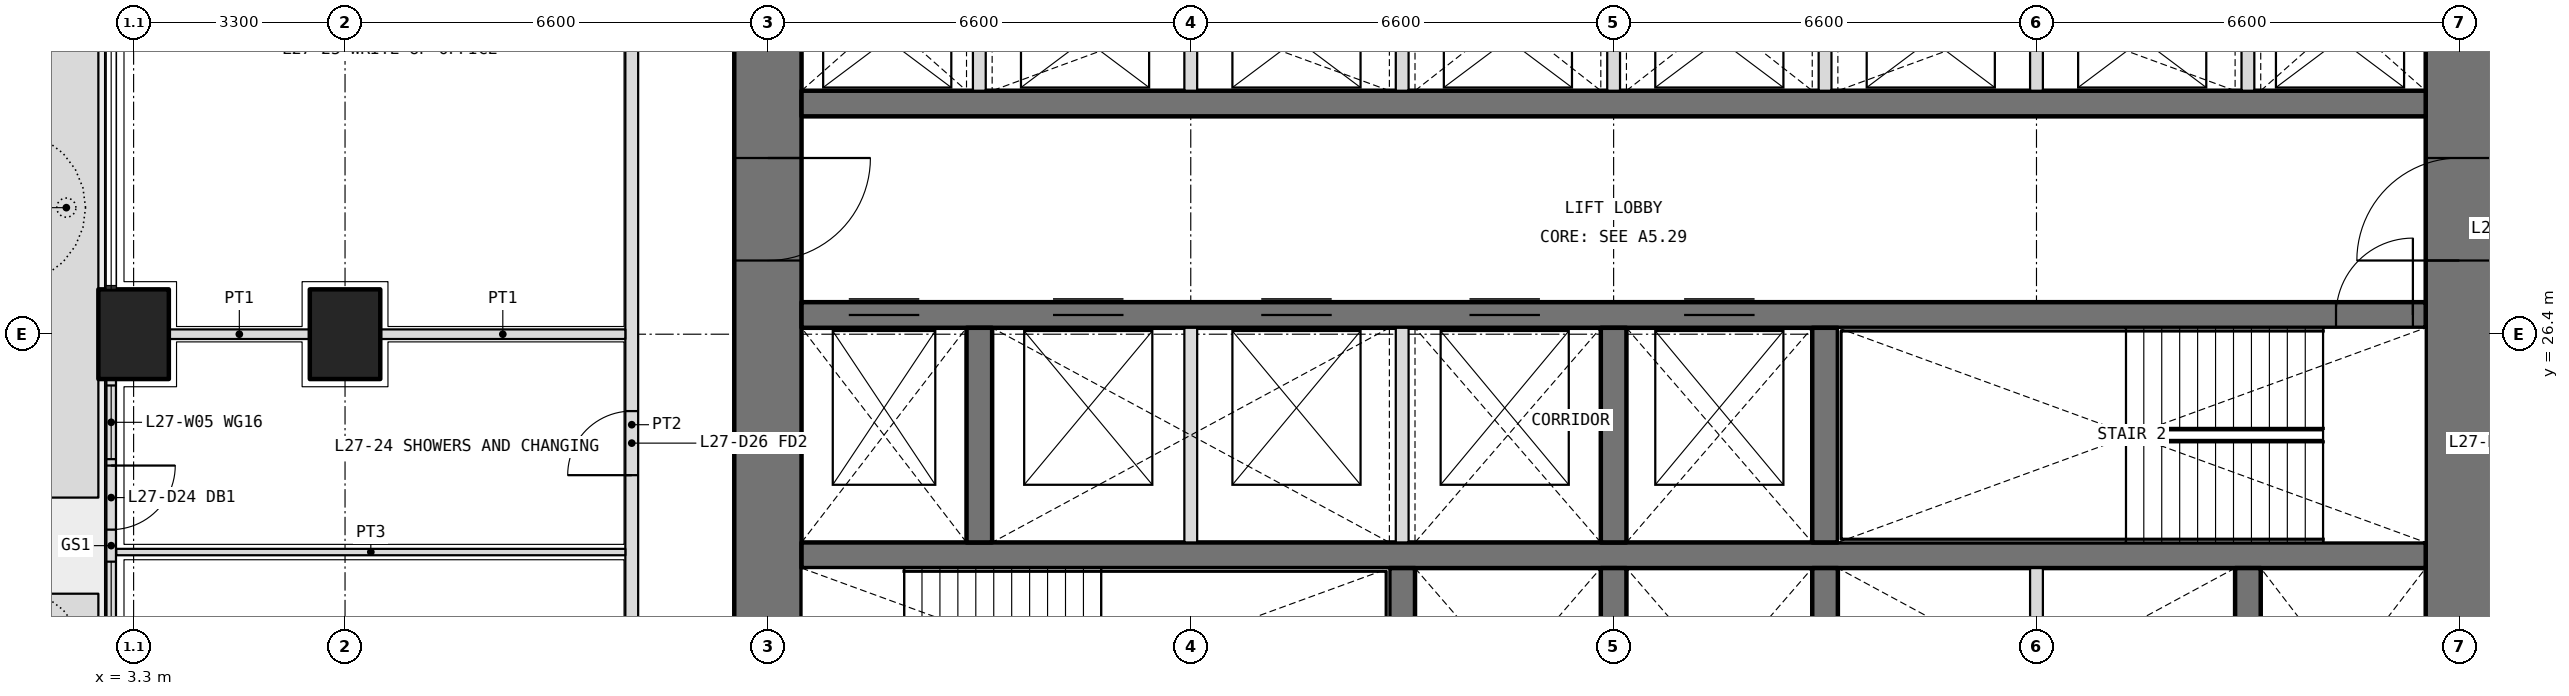
"""IFC4 building model, lengths in metres.
Left out: names, types, materials, properties, quantities, classifications, styles, units other than length and angle.
Written with IfcOpenShell. Run it as: python <this file> out.ifc"""

import sys

from ifc_helpers import new_model, si_unit, direction, frame, frame_2d, origin, origin_2d, place, context, subcontext, project, spatial, polyline, rectangle, outline, extrude, element, fill, save


model = new_model("IFC4")
c1 = context("Model", 3, precision=1e-05, world=origin(), true_north=direction((0.0, 1.0)))
c2 = subcontext(c1, "Body", "Model", "MODEL_VIEW")
j1 = project(units=[si_unit("LENGTHUNIT", "METRE"), si_unit("PLANEANGLEUNIT", "RADIAN")], contexts=[c1])
p1 = place(None, origin())
s1 = spatial("IfcSite", under=j1, at=p1, CompositionType="ELEMENT")
p2 = place(p1, origin())
s2 = spatial("IfcBuilding", under=s1, at=p2, CompositionType="ELEMENT")
p3 = place(p2, frame((0.0, 0.0, 120.0)))
s3 = spatial("IfcBuildingStorey", under=s2, at=p3, CompositionType="ELEMENT", Elevation=120.0)
for number, where, z_axis, x_axis in (
    (1, (3.3, 26.4, 0.0), (0.0, 0.0, 1.0), (0.0, 1.0, 0.0)),
    (2, (6.6, 26.4, 0.0), (0.0, 0.0, 1.0), (0.0, 1.0, 0.0)),
):
    element("IfcColumn", number, at=place(p3, frame(where, z_axis=z_axis, x_axis=x_axis)), inside=s3, PredefinedType="COLUMN", context=c2, shape_type="SweptSolid", body=[
        extrude(rectangle(XDim=1.4, YDim=1.1, at=origin_2d()), origin(), (0.0, 0.0, 1.0), 4.2),
    ])
p4 = place(p3, origin())
e3 = element("IfcWall", 3, at=p4, inside=s3, PredefinedType="USERDEFINED", context=c2, shape_type="SweptSolid", body=[
    extrude(outline(polyline([(1.75, 19.9), (2.75, 19.9), (2.75, 22.35), (1.75, 22.35), (1.75, 19.9)]), holes=[polyline([(1.9, 20.05), (2.6, 20.05), (2.6, 22.2), (1.9, 22.2), (1.9, 20.05)])]), origin(), (0.0, 0.0, 1.0), 1.05),
])
p5 = place(p3, origin())
e4 = element("IfcWall", 4, at=p5, inside=s3, PredefinedType="USERDEFINED", context=c2, shape_type="SweptSolid", body=[
    extrude(outline(polyline([(1.75, 23.85), (2.75, 23.85), (2.75, 32.9), (1.75, 32.9), (1.75, 23.85)]), holes=[polyline([(1.9, 24.0), (2.6, 24.0), (2.6, 32.75), (1.9, 32.75), (1.9, 24.0)])]), origin(), (0.0, 0.0, 1.0), 1.05),
])
p6 = place(p3, frame((2.95, 25.7, 0.0), z_axis=(0.0, 0.0, 1.0), x_axis=(0.0, -1.0, 0.0)))
e5 = element("IfcWall", 5, at=p6, inside=s3, PredefinedType="SOLIDWALL", context=c2, shape_type="SweptSolid", body=[
    extrude(rectangle(XDim=5.2, YDim=0.15, at=frame_2d((2.6, 0.0))), origin(), (0.0, 0.0, 1.0), 2.7),
])
p7 = place(p6, frame((1.35, 0.0, 0.0)))
e6 = element("IfcOpeningElement", 6, at=p7, cuts=e5, PredefinedType="OPENING", context=c2, shape_type="SweptSolid", body=[
    extrude(rectangle(XDim=1.0, YDim=2.4, at=frame_2d((0.5, 1.2))), frame((0.0, 0.085, 0.0), z_axis=(0.0, -1.0, 0.0), x_axis=(1.0, 0.0, 0.0)), (0.0, 0.0, 1.0), 0.17),
])
p8 = place(p6, frame((0.1, 0.0, 0.1)))
e7 = element("IfcOpeningElement", 7, at=p8, cuts=e5, PredefinedType="OPENING", context=c2, shape_type="SweptSolid", body=[
    extrude(rectangle(XDim=1.15, YDim=2.3, at=frame_2d((0.575, 1.15))), frame((0.0, 0.085, 0.0), z_axis=(0.0, -1.0, 0.0), x_axis=(1.0, 0.0, 0.0)), (0.0, 0.0, 1.0), 0.17),
])
p9 = place(p6, frame((2.85, 0.0, 0.1)))
e8 = element("IfcOpeningElement", 8, at=p9, cuts=e5, PredefinedType="OPENING", context=c2, shape_type="SweptSolid", body=[
    extrude(rectangle(XDim=2.25, YDim=2.3, at=frame_2d((1.125, 1.15))), frame((0.0, 0.085, 0.0), z_axis=(0.0, -1.0, 0.0), x_axis=(1.0, 0.0, 0.0)), (0.0, 0.0, 1.0), 0.17),
])
p10 = place(p3, frame((39.6, 13.725, 0.0), z_axis=(0.0, 0.0, 1.0), x_axis=(0.0, 1.0, 0.0)))
e9 = element("IfcWall", 9, at=p10, inside=s3, PredefinedType="SHEAR", context=c2, shape_type="SweptSolid", body=[
    extrude(rectangle(XDim=18.75, YDim=1.05, at=frame_2d((9.375, 0.0))), origin(), (0.0, 0.0, 1.0), 4.2),
])
p11 = place(p10, frame((3.025, 0.0, 0.0)))
e10 = element("IfcOpeningElement", 10, at=p11, cuts=e9, PredefinedType="OPENING", context=c2, shape_type="SweptSolid", body=[
    extrude(rectangle(XDim=1.6, YDim=2.1, at=frame_2d((0.8, 1.05))), frame((0.0, 0.535, 0.0), z_axis=(0.0, -1.0, 0.0), x_axis=(1.0, 0.0, 0.0)), (0.0, 0.0, 1.0), 1.07),
])
p12 = place(p10, frame((13.825, 0.0, 0.0)))
e11 = element("IfcOpeningElement", 11, at=p12, cuts=e9, PredefinedType="OPENING", context=c2, shape_type="SweptSolid", body=[
    extrude(rectangle(XDim=1.6, YDim=2.1, at=frame_2d((0.8, 1.05))), frame((0.0, 0.535, 0.0), z_axis=(0.0, -1.0, 0.0), x_axis=(1.0, 0.0, 0.0)), (0.0, 0.0, 1.0), 1.07),
])
p13 = place(p3, frame((13.2, 32.475, 0.0), z_axis=(0.0, 0.0, 1.0), x_axis=(0.0, -1.0, 0.0)))
e12 = element("IfcWall", 12, at=p13, inside=s3, PredefinedType="SHEAR", context=c2, shape_type="SweptSolid", body=[
    extrude(rectangle(XDim=18.75, YDim=1.05, at=frame_2d((9.375, 0.0))), origin(), (0.0, 0.0, 1.0), 4.2),
])
p14 = place(p13, frame((14.125, 0.0, 0.0)))
e13 = element("IfcOpeningElement", 13, at=p14, cuts=e12, PredefinedType="OPENING", context=c2, shape_type="SweptSolid", body=[
    extrude(rectangle(XDim=1.6, YDim=2.1, at=frame_2d((0.8, 1.05))), frame((0.0, 0.535, 0.0), z_axis=(0.0, -1.0, 0.0), x_axis=(1.0, 0.0, 0.0)), (0.0, 0.0, 1.0), 1.07),
])
p15 = place(p13, frame((3.325, 0.0, 0.0)))
e14 = element("IfcOpeningElement", 14, at=p15, cuts=e12, PredefinedType="OPENING", context=c2, shape_type="SweptSolid", body=[
    extrude(rectangle(XDim=1.6, YDim=2.1, at=frame_2d((0.8, 1.05))), frame((0.0, 0.535, 0.0), z_axis=(0.0, -1.0, 0.0), x_axis=(1.0, 0.0, 0.0)), (0.0, 0.0, 1.0), 1.07),
])
p16 = place(p3, frame((13.725, 22.95, 0.0), z_axis=(0.0, 0.0, 1.0), x_axis=(1.0, 0.0, 0.0)))
e15 = element("IfcWall", 15, at=p16, inside=s3, PredefinedType="SHEAR", context=c2, shape_type="SweptSolid", body=[
    extrude(rectangle(XDim=25.35, YDim=0.4, at=frame_2d((12.675, 0.0))), origin(), (0.0, 0.0, 1.0), 4.2),
])
p17 = place(p3, frame((13.725, 26.7, 0.0), z_axis=(0.0, 0.0, 1.0), x_axis=(1.0, 0.0, 0.0)))
e16 = element("IfcWall", 16, at=p17, inside=s3, PredefinedType="SHEAR", context=c2, shape_type="SweptSolid", body=[
    extrude(rectangle(XDim=25.35, YDim=0.4, at=frame_2d((12.675, 0.0))), origin(), (0.0, 0.0, 1.0), 4.2),
])
p18 = place(p17, frame((23.95, 0.0, 0.0)))
e17 = element("IfcOpeningElement", 17, at=p18, cuts=e16, PredefinedType="OPENING", context=c2, shape_type="SweptSolid", body=[
    extrude(rectangle(XDim=1.2, YDim=2.1, at=frame_2d((0.6, 1.05))), frame((0.0, 0.21, 0.0), z_axis=(0.0, -1.0, 0.0), x_axis=(1.0, 0.0, 0.0)), (0.0, 0.0, 1.0), 0.42),
])
p19 = place(p17, frame((0.738, 0.0, 0.0)))
e18 = element("IfcOpeningElement", 18, at=p19, cuts=e16, PredefinedType="OPENING", context=c2, shape_type="SweptSolid", body=[
    extrude(rectangle(XDim=1.1, YDim=2.1, at=frame_2d((0.55, 1.05))), frame((0.0, 0.21, 0.0), z_axis=(0.0, -1.0, 0.0), x_axis=(1.0, 0.0, 0.0)), (0.0, 0.0, 1.0), 0.42),
])
p20 = place(p17, frame((3.925, 0.0, 0.0)))
e19 = element("IfcOpeningElement", 19, at=p20, cuts=e16, PredefinedType="OPENING", context=c2, shape_type="SweptSolid", body=[
    extrude(rectangle(XDim=1.1, YDim=2.1, at=frame_2d((0.55, 1.05))), frame((0.0, 0.21, 0.0), z_axis=(0.0, -1.0, 0.0), x_axis=(1.0, 0.0, 0.0)), (0.0, 0.0, 1.0), 0.42),
])
p21 = place(p17, frame((7.175, 0.0, 0.0)))
e20 = element("IfcOpeningElement", 20, at=p21, cuts=e16, PredefinedType="OPENING", context=c2, shape_type="SweptSolid", body=[
    extrude(rectangle(XDim=1.1, YDim=2.1, at=frame_2d((0.55, 1.05))), frame((0.0, 0.21, 0.0), z_axis=(0.0, -1.0, 0.0), x_axis=(1.0, 0.0, 0.0)), (0.0, 0.0, 1.0), 0.42),
])
p22 = place(p17, frame((10.425, 0.0, 0.0)))
e21 = element("IfcOpeningElement", 21, at=p22, cuts=e16, PredefinedType="OPENING", context=c2, shape_type="SweptSolid", body=[
    extrude(rectangle(XDim=1.1, YDim=2.1, at=frame_2d((0.55, 1.05))), frame((0.0, 0.21, 0.0), z_axis=(0.0, -1.0, 0.0), x_axis=(1.0, 0.0, 0.0)), (0.0, 0.0, 1.0), 0.42),
])
p23 = place(p17, frame((13.775, 0.0, 0.0)))
e22 = element("IfcOpeningElement", 22, at=p23, cuts=e16, PredefinedType="OPENING", context=c2, shape_type="SweptSolid", body=[
    extrude(rectangle(XDim=1.1, YDim=2.1, at=frame_2d((0.55, 1.05))), frame((0.0, 0.21, 0.0), z_axis=(0.0, -1.0, 0.0), x_axis=(1.0, 0.0, 0.0)), (0.0, 0.0, 1.0), 0.42),
])
p24 = place(p3, frame((13.725, 30.0, 0.0), z_axis=(0.0, 0.0, 1.0), x_axis=(1.0, 0.0, 0.0)))
e23 = element("IfcWall", 23, at=p24, inside=s3, PredefinedType="SHEAR", context=c2, shape_type="SweptSolid", body=[
    extrude(rectangle(XDim=25.35, YDim=0.4, at=frame_2d((12.675, 0.0))), origin(), (0.0, 0.0, 1.0), 4.2),
])
for number, where, z_axis, x_axis in (
    (24, (23.1, 19.4, 0.0), (0.0, 0.0, 1.0), (0.0, 1.0, 0.0)),
    (25, (26.4, 19.4, 0.0), (0.0, 0.0, 1.0), (0.0, 1.0, 0.0)),
    (26, (29.7, 19.4, 0.0), (0.0, 0.0, 1.0), (0.0, 1.0, 0.0)),
    (27, (36.3, 19.4, 0.0), (0.0, 0.0, 1.0), (0.0, 1.0, 0.0)),
    (28, (16.5, 23.15, 0.0), (0.0, 0.0, 1.0), (0.0, 1.0, 0.0)),
    (29, (26.4, 23.15, 0.0), (0.0, 0.0, 1.0), (0.0, 1.0, 0.0)),
    (30, (29.7, 23.15, 0.0), (0.0, 0.0, 1.0), (0.0, 1.0, 0.0)),
):
    element("IfcWall", number, at=place(p3, frame(where, z_axis=z_axis, x_axis=x_axis)), inside=s3, PredefinedType="SHEAR", context=c2, shape_type="SweptSolid", body=[
        extrude(rectangle(XDim=3.35, YDim=0.4, at=frame_2d((1.675, 0.0))), origin(), (0.0, 0.0, 1.0), 4.2),
    ])
for number, where, z_axis, x_axis in (
    (31, (16.5, 30.2, 0.0), (0.0, 0.0, 1.0), (0.0, 1.0, 0.0)),
    (32, (19.8, 30.2, 0.0), (0.0, 0.0, 1.0), (0.0, 1.0, 0.0)),
    (33, (23.1, 30.2, 0.0), (0.0, 0.0, 1.0), (0.0, 1.0, 0.0)),
    (34, (26.4, 30.2, 0.0), (0.0, 0.0, 1.0), (0.0, 1.0, 0.0)),
    (35, (29.7, 30.2, 0.0), (0.0, 0.0, 1.0), (0.0, 1.0, 0.0)),
    (36, (33.0, 30.2, 0.0), (0.0, 0.0, 1.0), (0.0, 1.0, 0.0)),
    (37, (36.3, 30.2, 0.0), (0.0, 0.0, 1.0), (0.0, 1.0, 0.0)),
):
    element("IfcWall", number, at=place(p3, frame(where, z_axis=z_axis, x_axis=x_axis)), inside=s3, PredefinedType="PARTITIONING", context=c2, shape_type="SweptSolid", body=[
        extrude(rectangle(XDim=2.275, YDim=0.2, at=frame_2d((1.138, 0.0))), origin(), (0.0, 0.0, 1.0), 4.2),
    ])
for number, where, z_axis, x_axis in (
    (38, (33.0, 19.4, 0.0), (0.0, 0.0, 1.0), (0.0, 1.0, 0.0)),
    (39, (19.8, 23.15, 0.0), (0.0, 0.0, 1.0), (0.0, 1.0, 0.0)),
    (40, (23.1, 23.15, 0.0), (0.0, 0.0, 1.0), (0.0, 1.0, 0.0)),
):
    element("IfcWall", number, at=place(p3, frame(where, z_axis=z_axis, x_axis=x_axis)), inside=s3, PredefinedType="PARTITIONING", context=c2, shape_type="SweptSolid", body=[
        extrude(rectangle(XDim=3.35, YDim=0.2, at=frame_2d((1.675, 0.0))), origin(), (0.0, 0.0, 1.0), 4.2),
    ])
p25 = place(p3, frame((11.075, 11.175, 0.0), z_axis=(0.0, 0.0, 1.0), x_axis=(0.0, 1.0, 0.0)))
e41 = element("IfcWall", 41, at=p25, inside=s3, PredefinedType="PARTITIONING", context=c2, shape_type="SweptSolid", body=[
    extrude(rectangle(XDim=27.625, YDim=0.2, at=frame_2d((13.812, 0.0))), origin(), (0.0, 0.0, 1.0), 2.85),
])
p26 = place(p25, frame((0.462, 0.0, 0.0)))
e42 = element("IfcOpeningElement", 42, at=p26, cuts=e41, PredefinedType="OPENING", context=c2, shape_type="SweptSolid", body=[
    extrude(rectangle(XDim=1.0, YDim=2.1, at=frame_2d((0.5, 1.05))), frame((0.0, 0.11, 0.0), z_axis=(0.0, -1.0, 0.0), x_axis=(1.0, 0.0, 0.0)), (0.0, 0.0, 1.0), 0.22),
])
p27 = place(p25, frame((2.575, 0.0, 0.0)))
e43 = element("IfcOpeningElement", 43, at=p27, cuts=e41, PredefinedType="OPENING", context=c2, shape_type="SweptSolid", body=[
    extrude(rectangle(XDim=1.0, YDim=2.1, at=frame_2d((0.5, 1.05))), frame((0.0, 0.11, 0.0), z_axis=(0.0, -1.0, 0.0), x_axis=(1.0, 0.0, 0.0)), (0.0, 0.0, 1.0), 0.22),
])
p28 = place(p25, frame((5.65, 0.0, 0.0)))
e44 = element("IfcOpeningElement", 44, at=p28, cuts=e41, PredefinedType="OPENING", context=c2, shape_type="SweptSolid", body=[
    extrude(rectangle(XDim=0.9, YDim=2.1, at=frame_2d((0.45, 1.05))), frame((0.0, 0.11, 0.0), z_axis=(0.0, -1.0, 0.0), x_axis=(1.0, 0.0, 0.0)), (0.0, 0.0, 1.0), 0.22),
])
p29 = place(p25, frame((9.5, 0.0, 0.0)))
e45 = element("IfcOpeningElement", 45, at=p29, cuts=e41, PredefinedType="OPENING", context=c2, shape_type="SweptSolid", body=[
    extrude(rectangle(XDim=0.9, YDim=2.1, at=frame_2d((0.45, 1.05))), frame((0.0, 0.11, 0.0), z_axis=(0.0, -1.0, 0.0), x_axis=(1.0, 0.0, 0.0)), (0.0, 0.0, 1.0), 0.22),
])
p30 = place(p25, frame((13.025, 0.0, 0.0)))
e46 = element("IfcOpeningElement", 46, at=p30, cuts=e41, PredefinedType="OPENING", context=c2, shape_type="SweptSolid", body=[
    extrude(rectangle(XDim=1.0, YDim=2.1, at=frame_2d((0.5, 1.05))), frame((0.0, 0.11, 0.0), z_axis=(0.0, -1.0, 0.0), x_axis=(1.0, 0.0, 0.0)), (0.0, 0.0, 1.0), 0.22),
])
p31 = place(p25, frame((20.975, 0.0, 0.0)))
e47 = element("IfcOpeningElement", 47, at=p31, cuts=e41, PredefinedType="OPENING", context=c2, shape_type="SweptSolid", body=[
    extrude(rectangle(XDim=1.0, YDim=2.1, at=frame_2d((0.5, 1.05))), frame((0.0, 0.11, 0.0), z_axis=(0.0, -1.0, 0.0), x_axis=(1.0, 0.0, 0.0)), (0.0, 0.0, 1.0), 0.22),
])
p32 = place(p3, frame((3.03, 23.0, 0.0), z_axis=(0.0, 0.0, 1.0), x_axis=(1.0, 0.0, 0.0)))
e48 = element("IfcWall", 48, at=p32, inside=s3, PredefinedType="PARTITIONING", context=c2, shape_type="SweptSolid", body=[
    extrude(rectangle(XDim=7.945, YDim=0.1, at=frame_2d((3.973, 0.0))), origin(), (0.0, 0.0, 1.0), 2.7),
])
p33 = place(p3, frame((3.85, 26.4, 0.0), z_axis=(0.0, 0.0, 1.0), x_axis=(1.0, 0.0, 0.0)))
e49 = element("IfcWall", 49, at=p33, inside=s3, PredefinedType="PARTITIONING", context=c2, shape_type="SweptSolid", body=[
    extrude(rectangle(XDim=2.2, YDim=0.15, at=frame_2d((1.1, 0.0))), origin(), (0.0, 0.0, 1.0), 2.85),
])
p34 = place(p3, frame((7.15, 26.4, 0.0), z_axis=(0.0, 0.0, 1.0), x_axis=(1.0, 0.0, 0.0)))
e50 = element("IfcWall", 50, at=p34, inside=s3, PredefinedType="PARTITIONING", context=c2, shape_type="SweptSolid", body=[
    extrude(rectangle(XDim=3.825, YDim=0.15, at=frame_2d((1.913, 0.0))), origin(), (0.0, 0.0, 1.0), 2.85),
])
p35 = place(p7, origin())
e51 = element("IfcDoor", 51, at=p35, inside=s3, OperationType="SINGLE_SWING_LEFT", PredefinedType="DOOR", context=c2, shape_type="SweptSolid", body=[
    extrude(rectangle(XDim=1.0, YDim=2.4, at=frame_2d((0.5, 1.2))), frame((0.0, 0.025, 0.0), z_axis=(0.0, -1.0, 0.0), x_axis=(1.0, 0.0, 0.0)), (0.0, 0.0, 1.0), 0.05),
])
fill(e6, e51)
p36 = place(p8, origin())
e52 = element("IfcWindow", 52, at=p36, inside=s3, PartitioningType="SINGLE_PANEL", PredefinedType="WINDOW", context=c2, shape_type="SweptSolid", body=[
    extrude(rectangle(XDim=1.15, YDim=2.3, at=frame_2d((0.575, 1.15))), frame((0.0, 0.03, 0.0), z_axis=(0.0, -1.0, 0.0), x_axis=(1.0, 0.0, 0.0)), (0.0, 0.0, 1.0), 0.06),
])
fill(e7, e52)
p37 = place(p9, origin())
e53 = element("IfcWindow", 53, at=p37, inside=s3, PartitioningType="SINGLE_PANEL", PredefinedType="WINDOW", context=c2, shape_type="SweptSolid", body=[
    extrude(rectangle(XDim=2.25, YDim=2.3, at=frame_2d((1.125, 1.15))), frame((0.0, 0.03, 0.0), z_axis=(0.0, -1.0, 0.0), x_axis=(1.0, 0.0, 0.0)), (0.0, 0.0, 1.0), 0.06),
])
fill(e8, e53)
p38 = place(p30, origin())
e54 = element("IfcDoor", 54, at=p38, inside=s3, OperationType="SINGLE_SWING_LEFT", PredefinedType="DOOR", context=c2, shape_type="SweptSolid", body=[
    extrude(rectangle(XDim=1.0, YDim=2.1, at=frame_2d((0.5, 1.05))), frame((0.0, 0.025, 0.0), z_axis=(0.0, -1.0, 0.0), x_axis=(1.0, 0.0, 0.0)), (0.0, 0.0, 1.0), 0.05),
])
fill(e46, e54)
p39 = place(p18, origin())
e55 = element("IfcDoor", 55, at=p39, inside=s3, OperationType="SINGLE_SWING_RIGHT", PredefinedType="DOOR", context=c2, shape_type="SweptSolid", body=[
    extrude(rectangle(XDim=1.2, YDim=2.1, at=frame_2d((0.6, 1.05))), frame((0.0, 0.025, 0.0), z_axis=(0.0, -1.0, 0.0), x_axis=(1.0, 0.0, 0.0)), (0.0, 0.0, 1.0), 0.05),
])
fill(e17, e55)
p40 = place(p15, origin())
e56 = element("IfcDoor", 56, at=p40, inside=s3, OperationType="DOUBLE_DOOR_DOUBLE_SWING", PredefinedType="DOOR", context=c2, shape_type="SweptSolid", body=[
    extrude(rectangle(XDim=1.6, YDim=2.1, at=frame_2d((0.8, 1.05))), frame((0.0, 0.025, 0.0), z_axis=(0.0, -1.0, 0.0), x_axis=(1.0, 0.0, 0.0)), (0.0, 0.0, 1.0), 0.05),
])
fill(e14, e56)
p41 = place(p12, origin())
e57 = element("IfcDoor", 57, at=p41, inside=s3, OperationType="DOUBLE_DOOR_DOUBLE_SWING", PredefinedType="DOOR", context=c2, shape_type="SweptSolid", body=[
    extrude(rectangle(XDim=1.6, YDim=2.1, at=frame_2d((0.8, 1.05))), frame((0.0, 0.025, 0.0), z_axis=(0.0, -1.0, 0.0), x_axis=(1.0, 0.0, 0.0)), (0.0, 0.0, 1.0), 0.05),
])
fill(e11, e57)
p42 = place(p19, origin())
e58 = element("IfcDoor", 58, at=p42, inside=s3, OperationType="DOUBLE_DOOR_SLIDING", PredefinedType="DOOR", context=c2, shape_type="SweptSolid", body=[
    extrude(rectangle(XDim=1.1, YDim=2.1, at=frame_2d((0.55, 1.05))), frame((0.0, 0.025, 0.0), z_axis=(0.0, -1.0, 0.0), x_axis=(1.0, 0.0, 0.0)), (0.0, 0.0, 1.0), 0.05),
])
fill(e18, e58)
p43 = place(p20, origin())
e59 = element("IfcDoor", 59, at=p43, inside=s3, OperationType="DOUBLE_DOOR_SLIDING", PredefinedType="DOOR", context=c2, shape_type="SweptSolid", body=[
    extrude(rectangle(XDim=1.1, YDim=2.1, at=frame_2d((0.55, 1.05))), frame((0.0, 0.025, 0.0), z_axis=(0.0, -1.0, 0.0), x_axis=(1.0, 0.0, 0.0)), (0.0, 0.0, 1.0), 0.05),
])
fill(e19, e59)
p44 = place(p21, origin())
e60 = element("IfcDoor", 60, at=p44, inside=s3, OperationType="DOUBLE_DOOR_SLIDING", PredefinedType="DOOR", context=c2, shape_type="SweptSolid", body=[
    extrude(rectangle(XDim=1.1, YDim=2.1, at=frame_2d((0.55, 1.05))), frame((0.0, 0.025, 0.0), z_axis=(0.0, -1.0, 0.0), x_axis=(1.0, 0.0, 0.0)), (0.0, 0.0, 1.0), 0.05),
])
fill(e20, e60)
p45 = place(p22, origin())
e61 = element("IfcDoor", 61, at=p45, inside=s3, OperationType="DOUBLE_DOOR_SLIDING", PredefinedType="DOOR", context=c2, shape_type="SweptSolid", body=[
    extrude(rectangle(XDim=1.1, YDim=2.1, at=frame_2d((0.55, 1.05))), frame((0.0, 0.025, 0.0), z_axis=(0.0, -1.0, 0.0), x_axis=(1.0, 0.0, 0.0)), (0.0, 0.0, 1.0), 0.05),
])
fill(e21, e61)
p46 = place(p23, origin())
e62 = element("IfcDoor", 62, at=p46, inside=s3, OperationType="DOUBLE_DOOR_SLIDING", PredefinedType="DOOR", context=c2, shape_type="SweptSolid", body=[
    extrude(rectangle(XDim=1.1, YDim=2.1, at=frame_2d((0.55, 1.05))), frame((0.0, 0.025, 0.0), z_axis=(0.0, -1.0, 0.0), x_axis=(1.0, 0.0, 0.0)), (0.0, 0.0, 1.0), 0.05),
])
fill(e22, e62)
save(model, sys.argv[1])
